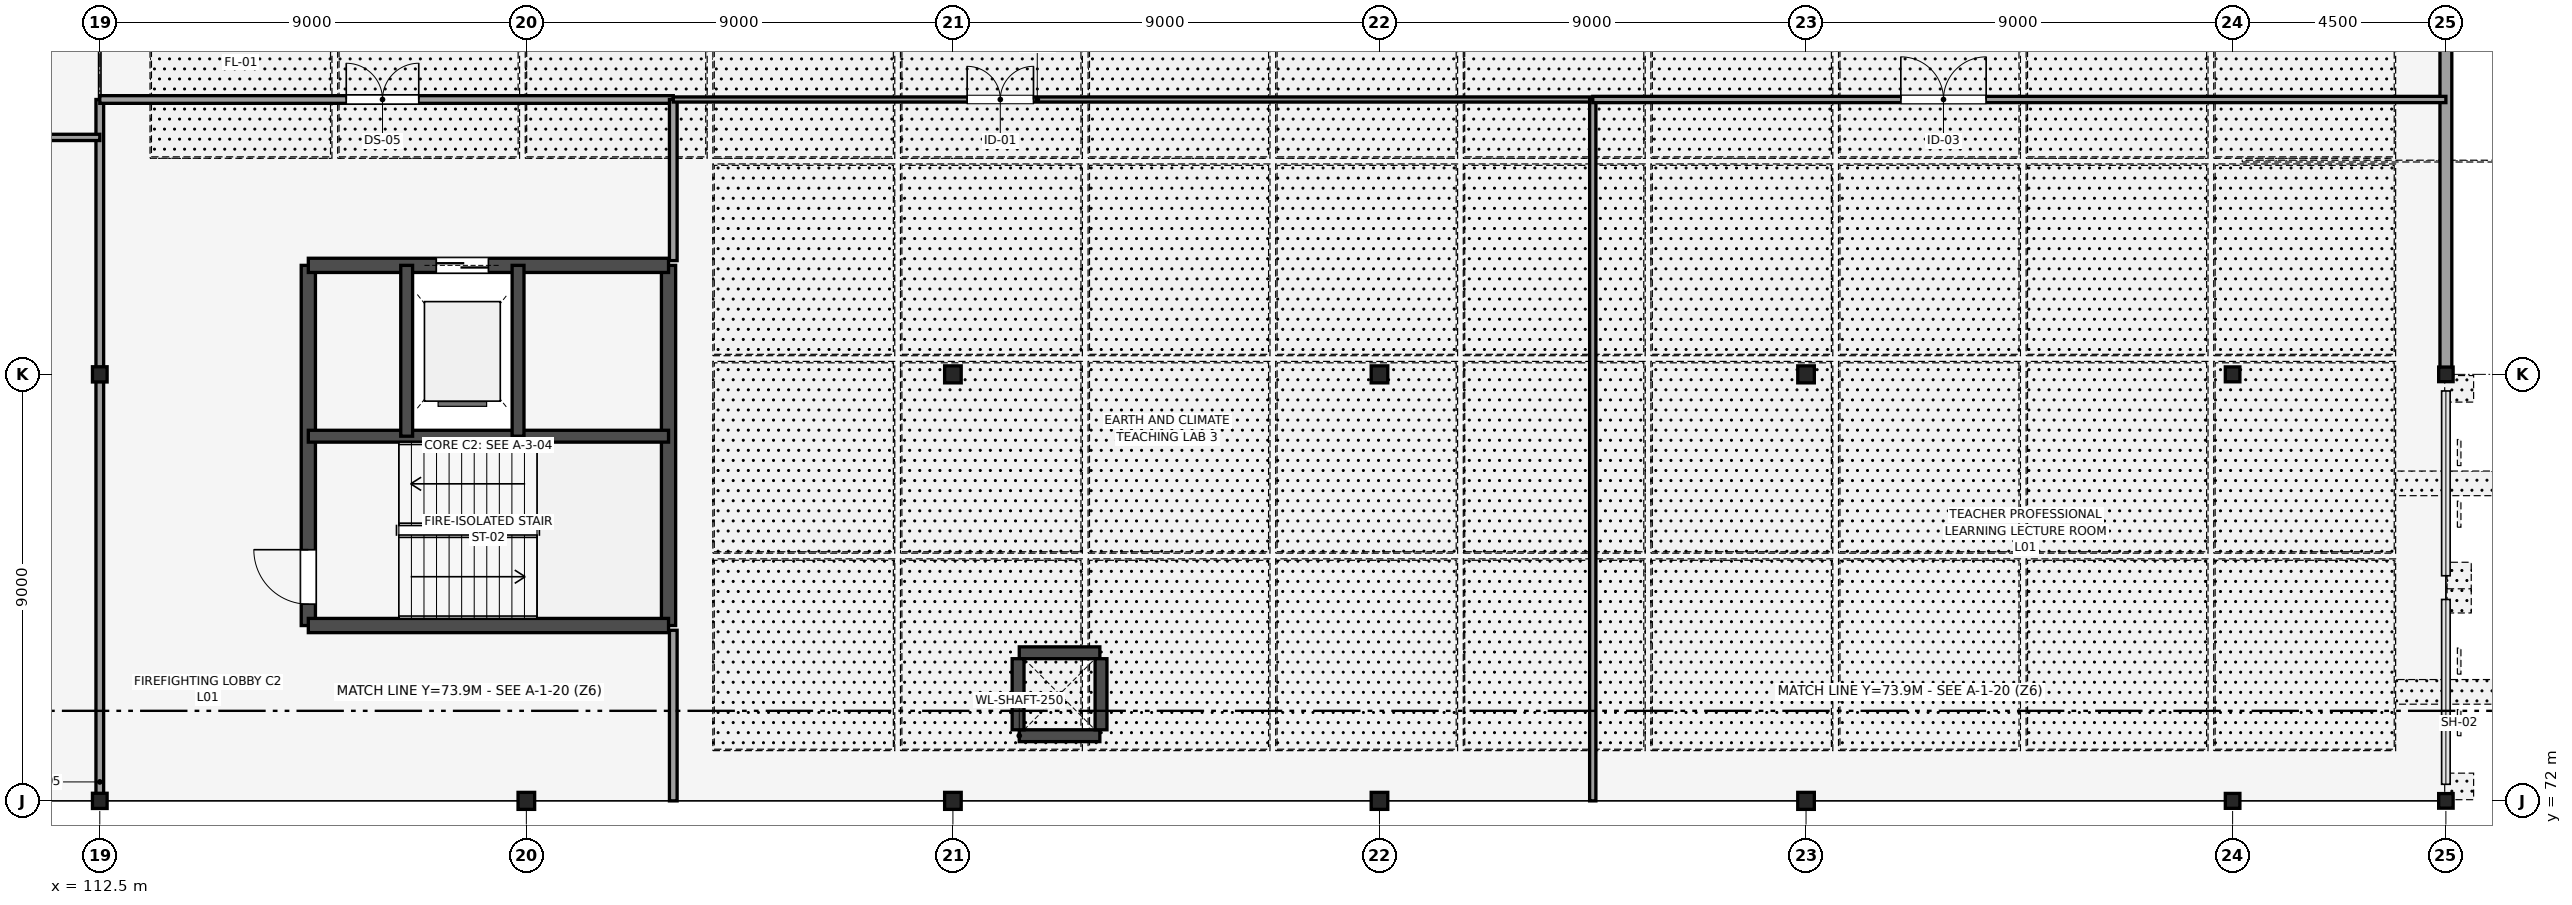
"""IFC4 building model, lengths in metres.
Left out: names, types, materials, properties, quantities, classifications, styles, units other than length and angle.
Written with IfcOpenShell. Run it as: python <this file> out.ifc"""

import sys

from ifc_helpers import new_model, si_unit, direction, frame, frame_2d, origin, origin_2d, place, context, subcontext, project, spatial, rectangle, i_section, extrude, element, fill, save


model = new_model("IFC4")
c1 = context("Model", 3, precision=1e-05, world=origin(), true_north=direction((0.0, 1.0)))
c2 = subcontext(c1, "Body", "Model", "MODEL_VIEW")
j1 = project(units=[si_unit("LENGTHUNIT", "METRE"), si_unit("PLANEANGLEUNIT", "RADIAN")], contexts=[c1])
p1 = place(None, origin())
s1 = spatial("IfcSite", under=j1, at=p1, CompositionType="ELEMENT")
p2 = place(p1, origin())
s2 = spatial("IfcBuilding", under=s1, at=p2, CompositionType="ELEMENT")
p3 = place(p2, frame((0.0, 0.0, 5.4)))
s3 = spatial("IfcBuildingStorey", under=s2, at=p3, CompositionType="ELEMENT", Elevation=5.4)
for number, where, z_axis, x_axis in (
    (1, (112.5, 72.0, 0.0), (0.0, 0.0, 1.0), (1.0, 0.0, 0.0)),
    (2, (112.5, 81.0, 0.0), (0.0, 0.0, 1.0), (1.0, 0.0, 0.0)),
):
    element("IfcColumn", number, at=place(p3, frame(where, z_axis=z_axis, x_axis=x_axis)), inside=s3, PredefinedType="COLUMN", context=c2, shape_type="SweptSolid", body=[
        extrude(i_section(OverallWidth=0.309, OverallDepth=0.321, WebThickness=0.014, FlangeThickness=0.022, FilletRadius=0.017, at=origin_2d()), origin(), (0.0, 0.0, 1.0), 4.5),
    ])
for number, where, z_axis, x_axis in (
    (3, (121.5, 72.0, 0.0), (0.0, 0.0, 1.0), (1.0, 0.0, 0.0)),
    (4, (130.5, 72.0, 0.0), (0.0, 0.0, 1.0), (1.0, 0.0, 0.0)),
    (5, (130.5, 81.0, 0.0), (0.0, 0.0, 1.0), (1.0, 0.0, 0.0)),
    (6, (139.5, 72.0, 0.0), (0.0, 0.0, 1.0), (1.0, 0.0, 0.0)),
    (7, (139.5, 81.0, 0.0), (0.0, 0.0, 1.0), (1.0, 0.0, 0.0)),
    (8, (148.5, 72.0, 0.0), (0.0, 0.0, 1.0), (1.0, 0.0, 0.0)),
    (9, (148.5, 81.0, 0.0), (0.0, 0.0, 1.0), (1.0, 0.0, 0.0)),
):
    element("IfcColumn", number, at=place(p3, frame(where, z_axis=z_axis, x_axis=x_axis)), inside=s3, PredefinedType="COLUMN", context=c2, shape_type="SweptSolid", body=[
        extrude(i_section(OverallWidth=0.35, OverallDepth=0.359, WebThickness=0.016, FlangeThickness=0.024, FilletRadius=0.014, at=origin_2d()), origin(), (0.0, 0.0, 1.0), 4.5),
    ])
for number, where, z_axis, x_axis in (
    (10, (157.5, 72.0, 0.0), (0.0, 0.0, 1.0), (1.0, 0.0, 0.0)),
    (11, (157.5, 81.0, 0.0), (0.0, 0.0, 1.0), (1.0, 0.0, 0.0)),
):
    element("IfcColumn", number, at=place(p3, frame(where, z_axis=z_axis, x_axis=x_axis)), inside=s3, PredefinedType="COLUMN", context=c2, shape_type="SweptSolid", body=[
        extrude(i_section(OverallWidth=0.307, OverallDepth=0.315, WebThickness=0.012, FlangeThickness=0.019, FilletRadius=0.017, at=origin_2d()), origin(), (0.0, 0.0, 1.0), 4.5),
    ])
for number, where, z_axis, x_axis in (
    (12, (162.0, 72.0, 0.0), (0.0, 0.0, 1.0), (1.0, 0.0, 0.0)),
    (13, (162.0, 81.0, 0.0), (0.0, 0.0, 1.0), (1.0, 0.0, 0.0)),
):
    element("IfcColumn", number, at=place(p3, frame(where, z_axis=z_axis, x_axis=x_axis)), inside=s3, PredefinedType="COLUMN", context=c2, shape_type="SweptSolid", body=[
        extrude(i_section(OverallWidth=0.305, OverallDepth=0.308, WebThickness=0.01, FlangeThickness=0.015, FilletRadius=0.017, at=origin_2d()), origin(), (0.0, 0.0, 1.0), 4.5),
    ])
p4 = place(p3, frame((116.9, 75.7, 0.0), z_axis=(0.0, 0.0, 1.0), x_axis=(0.0, 1.0, 0.0)))
e14 = element("IfcWall", 14, at=p4, inside=s3, PredefinedType="SHEAR", context=c2, shape_type="SweptSolid", body=[
    extrude(rectangle(XDim=7.6, YDim=0.3, at=frame_2d((3.8, 0.0))), origin(), (0.0, 0.0, 1.0), 4.5),
])
p5 = place(p4, frame((0.45, 0.0, 0.0)))
e15 = element("IfcOpeningElement", 15, at=p5, cuts=e14, PredefinedType="OPENING", context=c2, shape_type="SweptSolid", body=[
    extrude(rectangle(XDim=1.15, YDim=2.15, at=frame_2d((0.575, 1.075))), frame((0.0, 0.16, 0.0), z_axis=(0.0, -1.0, 0.0), x_axis=(1.0, 0.0, 0.0)), (0.0, 0.0, 1.0), 0.32),
])
for number, where, z_axis, x_axis in (
    (16, (124.5, 75.7, 0.0), (0.0, 0.0, 1.0), (0.0, 1.0, 0.0)),
    (17, (116.9, 75.7, 0.0), (0.0, 0.0, 1.0), (1.0, 0.0, 0.0)),
):
    element("IfcWall", number, at=place(p3, frame(where, z_axis=z_axis, x_axis=x_axis)), inside=s3, PredefinedType="SHEAR", context=c2, shape_type="SweptSolid", body=[
        extrude(rectangle(XDim=7.6, YDim=0.3, at=frame_2d((3.8, 0.0))), origin(), (0.0, 0.0, 1.0), 4.5),
    ])
p6 = place(p3, frame((116.9, 83.3, 0.0), z_axis=(0.0, 0.0, 1.0), x_axis=(1.0, 0.0, 0.0)))
e18 = element("IfcWall", 18, at=p6, inside=s3, PredefinedType="SHEAR", context=c2, shape_type="SweptSolid", body=[
    extrude(rectangle(XDim=7.6, YDim=0.3, at=frame_2d((3.8, 0.0))), origin(), (0.0, 0.0, 1.0), 4.5),
])
p7 = place(p6, frame((2.7, 0.0, 0.0)))
e19 = element("IfcOpeningElement", 19, at=p7, cuts=e18, PredefinedType="OPENING", context=c2, shape_type="SweptSolid", body=[
    extrude(rectangle(XDim=1.1, YDim=2.2, at=frame_2d((0.55, 1.1))), frame((0.0, 0.16, 0.0), z_axis=(0.0, -1.0, 0.0), x_axis=(1.0, 0.0, 0.0)), (0.0, 0.0, 1.0), 0.32),
])
p8 = place(p3, frame((116.9, 79.695, 0.0), z_axis=(0.0, 0.0, 1.0), x_axis=(1.0, 0.0, 0.0)))
e20 = element("IfcWall", 20, at=p8, inside=s3, PredefinedType="SHEAR", context=c2, shape_type="SweptSolid", body=[
    extrude(rectangle(XDim=7.6, YDim=0.25, at=frame_2d((3.8, 0.0))), origin(), (0.0, 0.0, 1.0), 4.5),
])
for number, where, z_axis, x_axis in (
    (21, (118.975, 79.695, 0.0), (0.0, 0.0, 1.0), (0.0, 1.0, 0.0)),
    (22, (121.325, 79.695, 0.0), (0.0, 0.0, 1.0), (0.0, 1.0, 0.0)),
):
    element("IfcWall", number, at=place(p3, frame(where, z_axis=z_axis, x_axis=x_axis)), inside=s3, PredefinedType="SHEAR", context=c2, shape_type="SweptSolid", body=[
        extrude(rectangle(XDim=3.605, YDim=0.25, at=frame_2d((1.802, 0.0))), origin(), (0.0, 0.0, 1.0), 4.5),
    ])
for number, where, z_axis, x_axis in (
    (23, (131.9, 73.375, 0.0), (0.0, 0.0, 1.0), (1.0, 0.0, 0.0)),
    (24, (131.9, 75.125, 0.0), (0.0, 0.0, 1.0), (1.0, 0.0, 0.0)),
):
    element("IfcWall", number, at=place(p3, frame(where, z_axis=z_axis, x_axis=x_axis)), inside=s3, PredefinedType="SHEAR", context=c2, shape_type="SweptSolid", body=[
        extrude(rectangle(XDim=1.7, YDim=0.25, at=frame_2d((0.85, 0.0))), origin(), (0.0, 0.0, 1.0), 3.77),
    ])
for number, where, z_axis, x_axis in (
    (25, (131.875, 73.5, 0.0), (0.0, 0.0, 1.0), (0.0, 1.0, 0.0)),
    (26, (133.625, 73.5, 0.0), (0.0, 0.0, 1.0), (0.0, 1.0, 0.0)),
):
    element("IfcWall", number, at=place(p3, frame(where, z_axis=z_axis, x_axis=x_axis)), inside=s3, PredefinedType="SHEAR", context=c2, shape_type="SweptSolid", body=[
        extrude(rectangle(XDim=1.5, YDim=0.25, at=frame_2d((0.75, 0.0))), origin(), (0.0, 0.0, 1.0), 3.77),
    ])
p9 = place(p3, frame((108.0, 72.0, 0.0), z_axis=(0.0, 0.0, 1.0), x_axis=(1.0, 0.0, 0.0)))
e27 = element("IfcWall", 27, at=p9, inside=s3, PredefinedType="STANDARD", context=c2, shape_type="SweptSolid", body=[
    extrude(rectangle(XDim=4.5, YDim=0.25, at=frame_2d((2.25, 0.0))), origin(), (0.0, 0.0, 1.0), 3.846),
])
p10 = place(p3, frame((157.5, 72.0, 0.0), z_axis=(0.0, 0.0, 1.0), x_axis=(1.0, 0.0, 0.0)))
e28 = element("IfcWall", 28, at=p10, inside=s3, PredefinedType="STANDARD", context=c2, shape_type="SweptSolid", body=[
    extrude(rectangle(XDim=4.5, YDim=0.23, at=frame_2d((2.25, 0.0))), origin(), (0.0, 0.0, 1.0), 3.846),
])
p11 = place(p10, frame((1.35, 0.0, 0.9)))
e29 = element("IfcOpeningElement", 29, at=p11, cuts=e28, PredefinedType="OPENING", context=c2, shape_type="SweptSolid", body=[
    extrude(rectangle(XDim=1.8, YDim=2.1, at=frame_2d((0.9, 1.05))), frame((0.0, 0.125, 0.0), z_axis=(0.0, -1.0, 0.0), x_axis=(1.0, 0.0, 0.0)), (0.0, 0.0, 1.0), 0.25),
])
p12 = place(p3, frame((162.0, 81.0, 0.0), z_axis=(0.0, 0.0, 1.0), x_axis=(0.0, 1.0, 0.0)))
e30 = element("IfcWall", 30, at=p12, inside=s3, PredefinedType="STANDARD", context=c2, shape_type="SweptSolid", body=[
    extrude(rectangle(XDim=9.0, YDim=0.25, at=frame_2d((4.5, 0.0))), origin(), (0.0, 0.0, 1.0), 3.846),
])
p13 = place(p3, frame((112.5, 72.0, 0.0), z_axis=(0.0, 0.0, 1.0), x_axis=(0.0, 1.0, 0.0)))
e31 = element("IfcWall", 31, at=p13, inside=s3, PredefinedType="PARTITIONING", context=c2, shape_type="SweptSolid", body=[
    extrude(rectangle(XDim=14.8, YDim=0.162, at=frame_2d((7.4, 0.0))), origin(), (0.0, 0.0, 1.0), 3.846),
])
p14 = place(p3, frame((112.5, 86.8, 0.0), z_axis=(0.0, 0.0, 1.0), x_axis=(1.0, 0.0, 0.0)))
e32 = element("IfcWall", 32, at=p14, inside=s3, PredefinedType="PARTITIONING", context=c2, shape_type="SweptSolid", body=[
    extrude(rectangle(XDim=12.1, YDim=0.162, at=frame_2d((6.05, 0.0))), origin(), (0.0, 0.0, 1.0), 4.32),
])
p15 = place(p14, frame((5.2, 0.0, 0.0)))
e33 = element("IfcOpeningElement", 33, at=p15, cuts=e32, PredefinedType="OPENING", context=c2, shape_type="SweptSolid", body=[
    extrude(rectangle(XDim=1.53, YDim=2.15, at=frame_2d((0.765, 1.075))), frame((0.0, 0.091, 0.0), z_axis=(0.0, -1.0, 0.0), x_axis=(1.0, 0.0, 0.0)), (0.0, 0.0, 1.0), 0.182),
])
p16 = place(p3, frame((124.6, 83.4, 0.0), z_axis=(0.0, 0.0, 1.0), x_axis=(0.0, 1.0, 0.0)))
e34 = element("IfcWall", 34, at=p16, inside=s3, PredefinedType="PARTITIONING", context=c2, shape_type="SweptSolid", body=[
    extrude(rectangle(XDim=3.4, YDim=0.162, at=frame_2d((1.7, 0.0))), origin(), (0.0, 0.0, 1.0), 4.32),
])
p17 = place(p3, frame((124.6, 72.0, 0.0), z_axis=(0.0, 0.0, 1.0), x_axis=(0.0, 1.0, 0.0)))
e35 = element("IfcWall", 35, at=p17, inside=s3, PredefinedType="PARTITIONING", context=c2, shape_type="SweptSolid", body=[
    extrude(rectangle(XDim=3.6, YDim=0.162, at=frame_2d((1.8, 0.0))), origin(), (0.0, 0.0, 1.0), 4.32),
])
p18 = place(p3, frame((99.0, 86.0, 0.0), z_axis=(0.0, 0.0, 1.0), x_axis=(1.0, 0.0, 0.0)))
e36 = element("IfcWall", 36, at=p18, inside=s3, PredefinedType="PARTITIONING", context=c2, shape_type="SweptSolid", body=[
    extrude(rectangle(XDim=13.5, YDim=0.132, at=frame_2d((6.75, 0.0))), origin(), (0.0, 0.0, 1.0), 4.32),
])
p19 = place(p18, frame((5.2, 0.0, 0.0)))
e37 = element("IfcOpeningElement", 37, at=p19, cuts=e36, PredefinedType="OPENING", context=c2, shape_type="SweptSolid", body=[
    extrude(rectangle(XDim=0.95, YDim=2.15, at=frame_2d((0.475, 1.075))), frame((0.0, 0.076, 0.0), z_axis=(0.0, -1.0, 0.0), x_axis=(1.0, 0.0, 0.0)), (0.0, 0.0, 1.0), 0.152),
])
p20 = place(p3, frame((124.6, 86.8, 0.0), z_axis=(0.0, 0.0, 1.0), x_axis=(1.0, 0.0, 0.0)))
e38 = element("IfcWall", 38, at=p20, inside=s3, PredefinedType="PARTITIONING", context=c2, shape_type="SweptSolid", body=[
    extrude(rectangle(XDim=19.4, YDim=0.108, at=frame_2d((9.7, 0.0))), origin(), (0.0, 0.0, 1.0), 4.32),
])
p21 = place(p20, frame((6.2, 0.0, 0.0)))
e39 = element("IfcOpeningElement", 39, at=p21, cuts=e38, PredefinedType="OPENING", context=c2, shape_type="SweptSolid", body=[
    extrude(rectangle(XDim=1.4, YDim=2.2, at=frame_2d((0.7, 1.1))), frame((0.0, 0.064, 0.0), z_axis=(0.0, -1.0, 0.0), x_axis=(1.0, 0.0, 0.0)), (0.0, 0.0, 1.0), 0.128),
])
p22 = place(p3, frame((144.0, 72.0, 0.0), z_axis=(0.0, 0.0, 1.0), x_axis=(0.0, 1.0, 0.0)))
e40 = element("IfcWall", 40, at=p22, inside=s3, PredefinedType="PARTITIONING", context=c2, shape_type="SweptSolid", body=[
    extrude(rectangle(XDim=14.8, YDim=0.132, at=frame_2d((7.4, 0.0))), origin(), (0.0, 0.0, 1.0), 4.32),
])
p23 = place(p3, frame((144.0, 86.8, 0.0), z_axis=(0.0, 0.0, 1.0), x_axis=(1.0, 0.0, 0.0)))
e41 = element("IfcWall", 41, at=p23, inside=s3, PredefinedType="PARTITIONING", context=c2, shape_type="SweptSolid", body=[
    extrude(rectangle(XDim=18.0, YDim=0.132, at=frame_2d((9.0, 0.0))), origin(), (0.0, 0.0, 1.0), 4.32),
])
p24 = place(p23, frame((6.5, 0.0, 0.0)))
e42 = element("IfcOpeningElement", 42, at=p24, cuts=e41, PredefinedType="OPENING", context=c2, shape_type="SweptSolid", body=[
    extrude(rectangle(XDim=1.8, YDim=2.3, at=frame_2d((0.9, 1.15))), frame((0.0, 0.076, 0.0), z_axis=(0.0, -1.0, 0.0), x_axis=(1.0, 0.0, 0.0)), (0.0, 0.0, 1.0), 0.152),
])
p25 = place(p11, origin())
e43 = element("IfcWindow", 43, at=p25, inside=s3, PartitioningType="SINGLE_PANEL", PredefinedType="WINDOW", context=c2, shape_type="SweptSolid", body=[
    extrude(rectangle(XDim=1.8, YDim=2.1, at=frame_2d((0.9, 1.05))), frame((0.0, 0.03, 0.0), z_axis=(0.0, -1.0, 0.0), x_axis=(1.0, 0.0, 0.0)), (0.0, 0.0, 1.0), 0.06),
])
fill(e29, e43)
p26 = place(p5, origin())
e44 = element("IfcDoor", 44, at=p26, inside=s3, OperationType="SINGLE_SWING_RIGHT", PredefinedType="DOOR", context=c2, shape_type="SweptSolid", body=[
    extrude(rectangle(XDim=1.15, YDim=2.15, at=frame_2d((0.575, 1.075))), frame((0.0, 0.025, 0.0), z_axis=(0.0, -1.0, 0.0), x_axis=(1.0, 0.0, 0.0)), (0.0, 0.0, 1.0), 0.05),
])
fill(e15, e44)
p27 = place(p7, origin())
e45 = element("IfcDoor", 45, at=p27, inside=s3, OperationType="DOUBLE_DOOR_SLIDING", PredefinedType="DOOR", context=c2, shape_type="SweptSolid", body=[
    extrude(rectangle(XDim=1.1, YDim=2.2, at=frame_2d((0.55, 1.1))), frame((0.0, 0.025, 0.0), z_axis=(0.0, -1.0, 0.0), x_axis=(1.0, 0.0, 0.0)), (0.0, 0.0, 1.0), 0.05),
])
fill(e19, e45)
p28 = place(p15, origin())
e46 = element("IfcDoor", 46, at=p28, inside=s3, OperationType="DOUBLE_DOOR_SINGLE_SWING", PredefinedType="DOOR", context=c2, shape_type="SweptSolid", body=[
    extrude(rectangle(XDim=1.53, YDim=2.15, at=frame_2d((0.765, 1.075))), frame((0.0, 0.025, 0.0), z_axis=(0.0, -1.0, 0.0), x_axis=(1.0, 0.0, 0.0)), (0.0, 0.0, 1.0), 0.05),
])
fill(e33, e46)
p29 = place(p21, origin())
e47 = element("IfcDoor", 47, at=p29, inside=s3, OperationType="DOUBLE_DOOR_SINGLE_SWING", PredefinedType="DOOR", context=c2, shape_type="SweptSolid", body=[
    extrude(rectangle(XDim=1.4, YDim=2.2, at=frame_2d((0.7, 1.1))), frame((0.0, 0.025, 0.0), z_axis=(0.0, -1.0, 0.0), x_axis=(1.0, 0.0, 0.0)), (0.0, 0.0, 1.0), 0.05),
])
fill(e39, e47)
p30 = place(p24, origin())
e48 = element("IfcDoor", 48, at=p30, inside=s3, OperationType="DOUBLE_DOOR_SINGLE_SWING", PredefinedType="DOOR", context=c2, shape_type="SweptSolid", body=[
    extrude(rectangle(XDim=1.8, YDim=2.3, at=frame_2d((0.9, 1.15))), frame((0.0, 0.025, 0.0), z_axis=(0.0, -1.0, 0.0), x_axis=(1.0, 0.0, 0.0)), (0.0, 0.0, 1.0), 0.05),
])
fill(e42, e48)
save(model, sys.argv[1])
